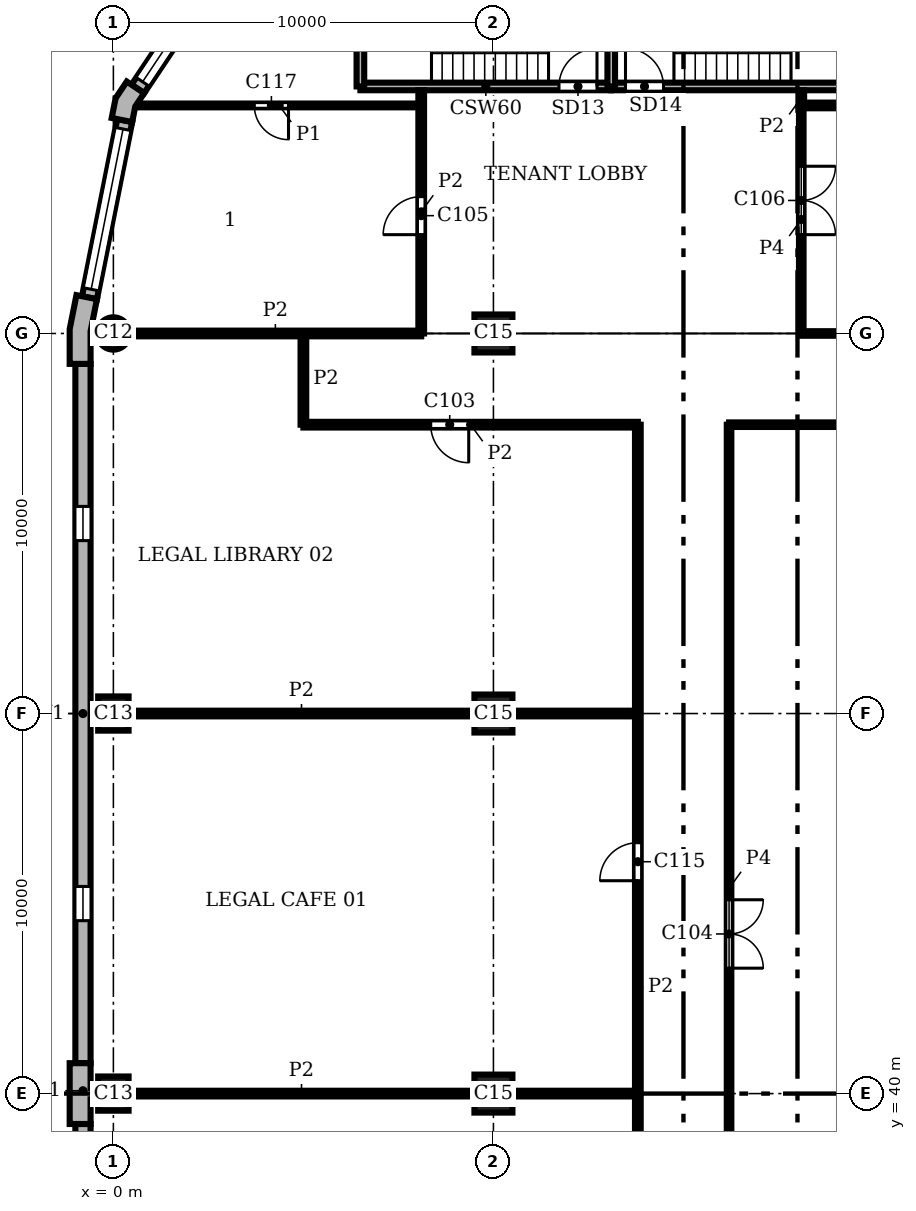
"""IFC4 building model, lengths in metres.
Left out: names, types, materials, properties, quantities, classifications, styles, units other than length and angle.
Written with IfcOpenShell. Run it as: python <this file> out.ifc"""

import sys

from ifc_helpers import new_model, si_unit, direction, frame, frame_2d, origin, origin_2d, place, context, subcontext, project, spatial, polyline, rectangle, circle, outline, extrude, element, fill, save


model = new_model("IFC4")
c1 = context("Model", 3, precision=1e-05, world=origin(), true_north=direction((0.0, 1.0)))
c2 = subcontext(c1, "Body", "Model", "MODEL_VIEW")
j1 = project(units=[si_unit("LENGTHUNIT", "METRE"), si_unit("PLANEANGLEUNIT", "RADIAN")], contexts=[c1])
p1 = place(None, origin())
s1 = spatial("IfcSite", under=j1, at=p1, CompositionType="ELEMENT")
p2 = place(p1, origin())
s2 = spatial("IfcBuilding", under=s1, at=p2, CompositionType="ELEMENT")
p3 = place(p2, frame((0.0, 0.0, 251.4)))
s3 = spatial("IfcBuildingStorey", under=s2, at=p3, CompositionType="ELEMENT", Elevation=251.4)
p4 = place(p3, frame((0.0, 60.0, 0.0), z_axis=(0.0, 0.0, 1.0), x_axis=(1.0, 0.0, 0.0)))
e1 = element("IfcColumn", 1, at=p4, inside=s3, PredefinedType="COLUMN", context=c2, shape_type="SweptSolid", body=[
    extrude(circle(Radius=0.425, at=origin_2d()), origin(), (0.0, 0.0, 1.0), 3.9),
])
for number, where, z_axis, x_axis in (
    (2, (0.0, 50.0, 0.0), (0.0, 0.0, 1.0), (0.0, 1.0, 0.0)),
    (3, (0.0, 40.0, 0.0), (0.0, 0.0, 1.0), (0.0, 1.0, 0.0)),
):
    element("IfcColumn", number, at=place(p3, frame(where, z_axis=z_axis, x_axis=x_axis)), inside=s3, PredefinedType="COLUMN", context=c2, shape_type="SweptSolid", body=[
        extrude(rectangle(XDim=0.9, YDim=0.8, at=origin_2d()), origin(), (0.0, 0.0, 1.0), 3.9),
    ])
for number, where, z_axis, x_axis in (
    (4, (10.0, 40.0, 0.0), (0.0, 0.0, 1.0), (1.0, 0.0, 0.0)),
    (5, (10.0, 50.0, 0.0), (0.0, 0.0, 1.0), (1.0, 0.0, 0.0)),
    (6, (10.0, 60.0, 0.0), (0.0, 0.0, 1.0), (1.0, 0.0, 0.0)),
):
    element("IfcColumn", number, at=place(p3, frame(where, z_axis=z_axis, x_axis=x_axis)), inside=s3, PredefinedType="COLUMN", context=c2, shape_type="SweptSolid", body=[
        extrude(rectangle(XDim=1.0, YDim=1.0, at=origin_2d()), origin(), (0.0, 0.0, 1.0), 3.9),
    ])
p5 = place(p3, origin())
e7 = element("IfcWall", 7, at=p5, inside=s3, PredefinedType="SOLIDWALL", context=c2, shape_type="SweptSolid", body=[
    extrude(outline(polyline([(0.477, 66.545), (0.352, 66.629), (0.059, 66.189), (-0.045, 65.67), (0.103, 65.641), (0.495, 65.563), (0.577, 65.974), (0.81, 66.323), (0.477, 66.545)])), origin(), (0.0, 0.0, 1.0), 3.9),
])
e8 = element("IfcWall", 8, at=p5, inside=s3, PredefinedType="SOLIDWALL", context=c2, shape_type="SweptSolid", body=[
    extrude(outline(polyline([(-0.825, 60.98), (-0.972, 61.009), (-1.15, 60.113), (-1.15, 59.2), (-1.0, 59.2), (-0.6, 59.2), (-0.6, 60.059), (-0.432, 60.902), (-0.825, 60.98)])), origin(), (0.0, 0.0, 1.0), 3.9),
])
e9 = element("IfcWall", 9, at=p5, inside=s3, PredefinedType="SOLIDWALL", context=c2, shape_type="SweptSolid", body=[
    extrude(outline(polyline([(-0.6, 39.2), (-0.6, 39.85), (-0.45, 39.85), (-0.45, 40.15), (-0.6, 40.15), (-0.6, 40.8), (-1.0, 40.8), (-1.15, 40.8), (-1.15, 40.0), (-1.15, 39.2), (-1.0, 39.2), (-0.6, 39.2)])), origin(), (0.0, 0.0, 1.0), 3.9),
])
p6 = place(p3, frame((3.284, 70.386, 0.0), z_axis=(0.0, 0.0, 1.0), x_axis=(-0.555541552266, -0.831488775454, 0.0)))
e10 = element("IfcWall", 10, at=p6, inside=s3, PredefinedType="SOLIDWALL", context=c2, shape_type="SweptSolid", body=[
    extrude(rectangle(XDim=4.753, YDim=0.4, at=frame_2d((2.376, 0.0))), origin(), (0.0, 0.0, 1.0), 3.9),
])
p7 = place(p6, frame((0.226, 0.0, 0.9)))
e11 = element("IfcOpeningElement", 11, at=p7, cuts=e10, PredefinedType="OPENING", context=c2, shape_type="SweptSolid", body=[
    extrude(rectangle(XDim=4.3, YDim=2.35, at=frame_2d((2.15, 1.175))), frame((0.0, 0.21, 0.0), z_axis=(0.0, -1.0, 0.0), x_axis=(1.0, 0.0, 0.0)), (0.0, 0.0, 1.0), 0.42),
])
p8 = place(p3, frame((0.299, 65.602, 0.0), z_axis=(0.0, 0.0, 1.0), x_axis=(-0.195098533057, -0.98078364709, 0.0)))
e12 = element("IfcWall", 12, at=p8, inside=s3, PredefinedType="SOLIDWALL", context=c2, shape_type="SweptSolid", body=[
    extrude(rectangle(XDim=4.753, YDim=0.4, at=frame_2d((2.376, 0.0))), origin(), (0.0, 0.0, 1.0), 3.9),
])
p9 = place(p8, frame((0.226, 0.0, 0.9)))
e13 = element("IfcOpeningElement", 13, at=p9, cuts=e12, PredefinedType="OPENING", context=c2, shape_type="SweptSolid", body=[
    extrude(rectangle(XDim=4.3, YDim=2.35, at=frame_2d((2.15, 1.175))), frame((0.0, 0.21, 0.0), z_axis=(0.0, -1.0, 0.0), x_axis=(1.0, 0.0, 0.0)), (0.0, 0.0, 1.0), 0.42),
])
p10 = place(p3, frame((-0.8, 59.2, 0.0), z_axis=(0.0, 0.0, 1.0), x_axis=(0.0, -1.0, 0.0)))
e14 = element("IfcWall", 14, at=p10, inside=s3, PredefinedType="SOLIDWALL", context=c2, shape_type="SweptSolid", body=[
    extrude(rectangle(XDim=18.4, YDim=0.4, at=frame_2d((9.2, 0.0))), origin(), (0.0, 0.0, 1.0), 3.9),
])
p11 = place(p10, frame((3.75, 0.0, 0.9)))
e15 = element("IfcOpeningElement", 15, at=p11, cuts=e14, PredefinedType="OPENING", context=c2, shape_type="SweptSolid", body=[
    extrude(rectangle(XDim=0.9, YDim=2.35, at=frame_2d((0.45, 1.175))), frame((0.0, 0.21, 0.0), z_axis=(0.0, -1.0, 0.0), x_axis=(1.0, 0.0, 0.0)), (0.0, 0.0, 1.0), 0.42),
])
p12 = place(p10, frame((13.75, 0.0, 0.9)))
e16 = element("IfcOpeningElement", 16, at=p12, cuts=e14, PredefinedType="OPENING", context=c2, shape_type="SweptSolid", body=[
    extrude(rectangle(XDim=0.9, YDim=2.35, at=frame_2d((0.45, 1.175))), frame((0.0, 0.21, 0.0), z_axis=(0.0, -1.0, 0.0), x_axis=(1.0, 0.0, 0.0)), (0.0, 0.0, 1.0), 0.42),
])
p13 = place(p3, frame((-0.8, 39.2, 0.0), z_axis=(0.0, 0.0, 1.0), x_axis=(0.0, -1.0, 0.0)))
e17 = element("IfcWall", 17, at=p13, inside=s3, PredefinedType="SOLIDWALL", context=c2, shape_type="SweptSolid", body=[
    extrude(rectangle(XDim=18.4, YDim=0.4, at=frame_2d((9.2, 0.0))), origin(), (0.0, 0.0, 1.0), 3.9),
])
p14 = place(p13, frame((3.75, 0.0, 0.9)))
e18 = element("IfcOpeningElement", 18, at=p14, cuts=e17, PredefinedType="OPENING", context=c2, shape_type="SweptSolid", body=[
    extrude(rectangle(XDim=0.9, YDim=2.35, at=frame_2d((0.45, 1.175))), frame((0.0, 0.21, 0.0), z_axis=(0.0, -1.0, 0.0), x_axis=(1.0, 0.0, 0.0)), (0.0, 0.0, 1.0), 0.42),
])
p15 = place(p13, frame((13.75, 0.0, 0.9)))
e19 = element("IfcOpeningElement", 19, at=p15, cuts=e17, PredefinedType="OPENING", context=c2, shape_type="SweptSolid", body=[
    extrude(rectangle(XDim=0.9, YDim=2.35, at=frame_2d((0.45, 1.175))), frame((0.0, 0.21, 0.0), z_axis=(0.0, -1.0, 0.0), x_axis=(1.0, 0.0, 0.0)), (0.0, 0.0, 1.0), 0.42),
])
p16 = place(p3, frame((6.5, 66.5, 0.0), z_axis=(0.0, 0.0, 1.0), x_axis=(1.0, 0.0, 0.0)))
e20 = element("IfcWall", 20, at=p16, inside=s3, PredefinedType="SHEAR", context=c2, shape_type="SweptSolid", body=[
    extrude(rectangle(XDim=6.6, YDim=0.2, at=frame_2d((3.3, 0.0))), origin(), (0.0, 0.0, 1.0), 3.58),
])
p17 = place(p16, frame((5.225, 0.0, 0.0)))
e21 = element("IfcOpeningElement", 21, at=p17, cuts=e20, PredefinedType="OPENING", context=c2, shape_type="SweptSolid", body=[
    extrude(rectangle(XDim=1.0, YDim=2.1, at=frame_2d((0.5, 1.05))), frame((0.0, 0.11, 0.0), z_axis=(0.0, -1.0, 0.0), x_axis=(1.0, 0.0, 0.0)), (0.0, 0.0, 1.0), 0.22),
])
p18 = place(p3, frame((13.1, 66.5, 0.0), z_axis=(0.0, 0.0, 1.0), x_axis=(1.0, 0.0, 0.0)))
e22 = element("IfcWall", 22, at=p18, inside=s3, PredefinedType="SHEAR", context=c2, shape_type="SweptSolid", body=[
    extrude(rectangle(XDim=6.6, YDim=0.2, at=frame_2d((3.3, 0.0))), origin(), (0.0, 0.0, 1.0), 3.58),
])
p19 = place(p18, frame((0.375, 0.0, 0.0)))
e23 = element("IfcOpeningElement", 23, at=p19, cuts=e22, PredefinedType="OPENING", context=c2, shape_type="SweptSolid", body=[
    extrude(rectangle(XDim=1.0, YDim=2.1, at=frame_2d((0.5, 1.05))), frame((0.0, 0.11, 0.0), z_axis=(0.0, -1.0, 0.0), x_axis=(1.0, 0.0, 0.0)), (0.0, 0.0, 1.0), 0.22),
])
for number, where, z_axis, x_axis in (
    (24, (6.5, 66.5, 0.0), (0.0, 0.0, 1.0), (0.0, 1.0, 0.0)),
    (25, (13.1, 66.5, 0.0), (0.0, 0.0, 1.0), (0.0, 1.0, 0.0)),
):
    element("IfcWall", number, at=place(p3, frame(where, z_axis=z_axis, x_axis=x_axis)), inside=s3, PredefinedType="SHEAR", context=c2, shape_type="SweptSolid", body=[
        extrude(rectangle(XDim=3.3, YDim=0.2, at=frame_2d((1.65, 0.0))), origin(), (0.0, 0.0, 1.0), 3.58),
    ])
p20 = place(p3, frame((0.627, 66.0, 0.0), z_axis=(0.0, 0.0, 1.0), x_axis=(1.0, 0.0, 0.0)))
e26 = element("IfcWall", 26, at=p20, inside=s3, PredefinedType="PARTITIONING", context=c2, shape_type="SweptSolid", body=[
    extrude(rectangle(XDim=7.473, YDim=0.1, at=frame_2d((3.736, 0.0))), origin(), (0.0, 0.0, 1.0), 3.58),
])
p21 = place(p20, frame((3.081, 0.0, 0.0)))
e27 = element("IfcOpeningElement", 27, at=p21, cuts=e26, PredefinedType="OPENING", context=c2, shape_type="SweptSolid", body=[
    extrude(rectangle(XDim=0.9, YDim=2.1, at=frame_2d((0.45, 1.05))), frame((0.0, 0.06, 0.0), z_axis=(0.0, -1.0, 0.0), x_axis=(1.0, 0.0, 0.0)), (0.0, 0.0, 1.0), 0.12),
])
p22 = place(p3, frame((5.0, 57.6, 0.0), z_axis=(0.0, 0.0, 1.0), x_axis=(0.0, 1.0, 0.0)))
e28 = element("IfcWall", 28, at=p22, inside=s3, PredefinedType="PARTITIONING", context=c2, shape_type="SweptSolid", body=[
    extrude(rectangle(XDim=2.4, YDim=0.15, at=frame_2d((1.2, 0.0))), origin(), (0.0, 0.0, 1.0), 3.58),
])
p23 = place(p3, frame((8.1, 60.0, 0.0), z_axis=(0.0, 0.0, 1.0), x_axis=(0.0, 1.0, 0.0)))
e29 = element("IfcWall", 29, at=p23, inside=s3, PredefinedType="PARTITIONING", context=c2, shape_type="SweptSolid", body=[
    extrude(rectangle(XDim=6.4, YDim=0.15, at=frame_2d((3.2, 0.0))), origin(), (0.0, 0.0, 1.0), 3.58),
])
p24 = place(p23, frame((2.6, 0.0, 0.0)))
e30 = element("IfcOpeningElement", 30, at=p24, cuts=e29, PredefinedType="OPENING", context=c2, shape_type="SweptSolid", body=[
    extrude(rectangle(XDim=1.0, YDim=2.1, at=frame_2d((0.5, 1.05))), frame((0.0, 0.085, 0.0), z_axis=(0.0, -1.0, 0.0), x_axis=(1.0, 0.0, 0.0)), (0.0, 0.0, 1.0), 0.17),
])
p25 = place(p3, frame((13.8, 28.0, 0.0), z_axis=(0.0, 0.0, 1.0), x_axis=(0.0, 1.0, 0.0)))
e31 = element("IfcWall", 31, at=p25, inside=s3, PredefinedType="PARTITIONING", context=c2, shape_type="SweptSolid", body=[
    extrude(rectangle(XDim=29.6, YDim=0.15, at=frame_2d((14.8, 0.0))), origin(), (0.0, 0.0, 1.0), 3.58),
])
p26 = place(p25, frame((17.601, 0.0, 0.0)))
e32 = element("IfcOpeningElement", 32, at=p26, cuts=e31, PredefinedType="OPENING", context=c2, shape_type="SweptSolid", body=[
    extrude(rectangle(XDim=1.0, YDim=2.1, at=frame_2d((0.5, 1.05))), frame((0.0, 0.085, 0.0), z_axis=(0.0, -1.0, 0.0), x_axis=(1.0, 0.0, 0.0)), (0.0, 0.0, 1.0), 0.17),
])
p27 = place(p3, frame((18.1, 66.0, 0.0), z_axis=(0.0, 0.0, 1.0), x_axis=(0.0, 1.0, 0.0)))
e33 = element("IfcWall", 33, at=p27, inside=s3, PredefinedType="PARTITIONING", context=c2, shape_type="SweptSolid", body=[
    extrude(rectangle(XDim=0.4, YDim=0.15, at=frame_2d((0.2, 0.0))), origin(), (0.0, 0.0, 1.0), 3.58),
])
p28 = place(p3, frame((0.4, 40.0, 0.0), z_axis=(0.0, 0.0, 1.0), x_axis=(1.0, 0.0, 0.0)))
e34 = element("IfcWall", 34, at=p28, inside=s3, PredefinedType="PARTITIONING", context=c2, shape_type="SweptSolid", body=[
    extrude(rectangle(XDim=9.1, YDim=0.15, at=frame_2d((4.55, 0.0))), origin(), (0.0, 0.0, 1.0), 3.58),
])
p29 = place(p3, frame((10.5, 40.0, 0.0), z_axis=(0.0, 0.0, 1.0), x_axis=(1.0, 0.0, 0.0)))
e35 = element("IfcWall", 35, at=p29, inside=s3, PredefinedType="PARTITIONING", context=c2, shape_type="SweptSolid", body=[
    extrude(rectangle(XDim=3.3, YDim=0.15, at=frame_2d((1.65, 0.0))), origin(), (0.0, 0.0, 1.0), 3.58),
])
p30 = place(p3, frame((0.4, 50.0, 0.0), z_axis=(0.0, 0.0, 1.0), x_axis=(1.0, 0.0, 0.0)))
e36 = element("IfcWall", 36, at=p30, inside=s3, PredefinedType="PARTITIONING", context=c2, shape_type="SweptSolid", body=[
    extrude(rectangle(XDim=9.1, YDim=0.15, at=frame_2d((4.55, 0.0))), origin(), (0.0, 0.0, 1.0), 3.58),
])
p31 = place(p3, frame((10.5, 50.0, 0.0), z_axis=(0.0, 0.0, 1.0), x_axis=(1.0, 0.0, 0.0)))
e37 = element("IfcWall", 37, at=p31, inside=s3, PredefinedType="PARTITIONING", context=c2, shape_type="SweptSolid", body=[
    extrude(rectangle(XDim=3.3, YDim=0.15, at=frame_2d((1.65, 0.0))), origin(), (0.0, 0.0, 1.0), 3.58),
])
p32 = place(p3, frame((5.0, 57.6, 0.0), z_axis=(0.0, 0.0, 1.0), x_axis=(1.0, 0.0, 0.0)))
e38 = element("IfcWall", 38, at=p32, inside=s3, PredefinedType="PARTITIONING", context=c2, shape_type="SweptSolid", body=[
    extrude(rectangle(XDim=8.8, YDim=0.15, at=frame_2d((4.4, 0.0))), origin(), (0.0, 0.0, 1.0), 3.58),
])
p33 = place(p32, frame((3.35, 0.0, 0.0)))
e39 = element("IfcOpeningElement", 39, at=p33, cuts=e38, PredefinedType="OPENING", context=c2, shape_type="SweptSolid", body=[
    extrude(rectangle(XDim=1.0, YDim=2.1, at=frame_2d((0.5, 1.05))), frame((0.0, 0.085, 0.0), z_axis=(0.0, -1.0, 0.0), x_axis=(1.0, 0.0, 0.0)), (0.0, 0.0, 1.0), 0.17),
])
p34 = place(p3, frame((0.425, 60.0, 0.0), z_axis=(0.0, 0.0, 1.0), x_axis=(1.0, 0.0, 0.0)))
e40 = element("IfcWall", 40, at=p34, inside=s3, PredefinedType="PARTITIONING", context=c2, shape_type="SweptSolid", body=[
    extrude(rectangle(XDim=7.675, YDim=0.15, at=frame_2d((3.837, 0.0))), origin(), (0.0, 0.0, 1.0), 3.58),
])
p35 = place(p3, frame((18.1, 66.0, 0.0), z_axis=(0.0, 0.0, 1.0), x_axis=(1.0, 0.0, 0.0)))
e41 = element("IfcWall", 41, at=p35, inside=s3, PredefinedType="PARTITIONING", context=c2, shape_type="SweptSolid", body=[
    extrude(rectangle(XDim=11.256, YDim=0.15, at=frame_2d((5.628, 0.0))), origin(), (0.0, 0.0, 1.0), 3.58),
])
p36 = place(p3, frame((16.2, 33.2, 0.0), z_axis=(0.0, 0.0, 1.0), x_axis=(0.0, 1.0, 0.0)))
e42 = element("IfcWall", 42, at=p36, inside=s3, PredefinedType="PARTITIONING", context=c2, shape_type="SweptSolid", body=[
    extrude(rectangle(XDim=24.4, YDim=0.12, at=frame_2d((12.2, 0.0))), origin(), (0.0, 0.0, 1.0), 3.58),
])
p37 = place(p36, frame((10.1, 0.0, 0.0)))
e43 = element("IfcOpeningElement", 43, at=p37, cuts=e42, PredefinedType="OPENING", context=c2, shape_type="SweptSolid", body=[
    extrude(rectangle(XDim=1.8, YDim=2.1, at=frame_2d((0.9, 1.05))), frame((0.0, 0.07, 0.0), z_axis=(0.0, -1.0, 0.0), x_axis=(1.0, 0.0, 0.0)), (0.0, 0.0, 1.0), 0.14),
])
p38 = place(p3, frame((18.1, 60.0, 0.0), z_axis=(0.0, 0.0, 1.0), x_axis=(0.0, 1.0, 0.0)))
e44 = element("IfcWall", 44, at=p38, inside=s3, PredefinedType="PARTITIONING", context=c2, shape_type="SweptSolid", body=[
    extrude(rectangle(XDim=6.0, YDim=0.12, at=frame_2d((3.0, 0.0))), origin(), (0.0, 0.0, 1.0), 3.58),
])
p39 = place(p38, frame((2.6, 0.0, 0.0)))
e45 = element("IfcOpeningElement", 45, at=p39, cuts=e44, PredefinedType="OPENING", context=c2, shape_type="SweptSolid", body=[
    extrude(rectangle(XDim=1.8, YDim=2.1, at=frame_2d((0.9, 1.05))), frame((0.0, 0.07, 0.0), z_axis=(0.0, -1.0, 0.0), x_axis=(1.0, 0.0, 0.0)), (0.0, 0.0, 1.0), 0.14),
])
p40 = place(p3, frame((16.2, 57.6, 0.0), z_axis=(0.0, 0.0, 1.0), x_axis=(1.0, 0.0, 0.0)))
e46 = element("IfcWall", 46, at=p40, inside=s3, PredefinedType="PARTITIONING", context=c2, shape_type="SweptSolid", body=[
    extrude(rectangle(XDim=8.8, YDim=0.12, at=frame_2d((4.4, 0.0))), origin(), (0.0, 0.0, 1.0), 3.58),
])
p41 = place(p3, frame((18.1, 60.0, 0.0), z_axis=(0.0, 0.0, 1.0), x_axis=(1.0, 0.0, 0.0)))
e47 = element("IfcWall", 47, at=p41, inside=s3, PredefinedType="PARTITIONING", context=c2, shape_type="SweptSolid", body=[
    extrude(rectangle(XDim=1.4, YDim=0.12, at=frame_2d((0.7, 0.0))), origin(), (0.0, 0.0, 1.0), 3.58),
])
p42 = place(p7, origin())
e48 = element("IfcWindow", 48, at=p42, inside=s3, PartitioningType="SINGLE_PANEL", PredefinedType="WINDOW", context=c2, shape_type="SweptSolid", body=[
    extrude(rectangle(XDim=4.3, YDim=2.35, at=frame_2d((2.15, 1.175))), frame((0.0, 0.16, 0.0), z_axis=(0.0, -1.0, 0.0), x_axis=(1.0, 0.0, 0.0)), (0.0, 0.0, 1.0), 0.06),
])
fill(e11, e48)
p43 = place(p9, origin())
e49 = element("IfcWindow", 49, at=p43, inside=s3, PartitioningType="SINGLE_PANEL", PredefinedType="WINDOW", context=c2, shape_type="SweptSolid", body=[
    extrude(rectangle(XDim=4.3, YDim=2.35, at=frame_2d((2.15, 1.175))), frame((0.0, 0.16, 0.0), z_axis=(0.0, -1.0, 0.0), x_axis=(1.0, 0.0, 0.0)), (0.0, 0.0, 1.0), 0.06),
])
fill(e13, e49)
p44 = place(p11, origin())
e50 = element("IfcWindow", 50, at=p44, inside=s3, PartitioningType="SINGLE_PANEL", PredefinedType="WINDOW", context=c2, shape_type="SweptSolid", body=[
    extrude(rectangle(XDim=0.9, YDim=2.35, at=frame_2d((0.45, 1.175))), frame((0.0, 0.16, 0.0), z_axis=(0.0, -1.0, 0.0), x_axis=(1.0, 0.0, 0.0)), (0.0, 0.0, 1.0), 0.06),
])
fill(e15, e50)
p45 = place(p12, origin())
e51 = element("IfcWindow", 51, at=p45, inside=s3, PartitioningType="SINGLE_PANEL", PredefinedType="WINDOW", context=c2, shape_type="SweptSolid", body=[
    extrude(rectangle(XDim=0.9, YDim=2.35, at=frame_2d((0.45, 1.175))), frame((0.0, 0.16, 0.0), z_axis=(0.0, -1.0, 0.0), x_axis=(1.0, 0.0, 0.0)), (0.0, 0.0, 1.0), 0.06),
])
fill(e16, e51)
p46 = place(p17, origin())
e52 = element("IfcDoor", 52, at=p46, inside=s3, OperationType="SINGLE_SWING_RIGHT", PredefinedType="DOOR", context=c2, shape_type="SweptSolid", body=[
    extrude(rectangle(XDim=1.0, YDim=2.1, at=frame_2d((0.5, 1.05))), frame((0.0, 0.025, 0.0), z_axis=(0.0, -1.0, 0.0), x_axis=(1.0, 0.0, 0.0)), (0.0, 0.0, 1.0), 0.05),
])
fill(e21, e52)
p47 = place(p19, origin())
e53 = element("IfcDoor", 53, at=p47, inside=s3, OperationType="SINGLE_SWING_LEFT", PredefinedType="DOOR", context=c2, shape_type="SweptSolid", body=[
    extrude(rectangle(XDim=1.0, YDim=2.1, at=frame_2d((0.5, 1.05))), frame((0.0, 0.025, 0.0), z_axis=(0.0, -1.0, 0.0), x_axis=(1.0, 0.0, 0.0)), (0.0, 0.0, 1.0), 0.05),
])
fill(e23, e53)
p48 = place(p33, frame((1.0, 0.0, 0.0), z_axis=(0.0, 0.0, 1.0), x_axis=(-1.0, 0.0, 0.0)))
e54 = element("IfcDoor", 54, at=p48, inside=s3, OperationType="SINGLE_SWING_LEFT", PredefinedType="DOOR", context=c2, shape_type="SweptSolid", body=[
    extrude(rectangle(XDim=1.0, YDim=2.1, at=frame_2d((0.5, 1.05))), frame((0.0, 0.025, 0.0), z_axis=(0.0, -1.0, 0.0), x_axis=(1.0, 0.0, 0.0)), (0.0, 0.0, 1.0), 0.05),
])
fill(e39, e54)
p49 = place(p37, frame((1.8, 0.0, 0.0), z_axis=(0.0, 0.0, 1.0), x_axis=(-1.0, 0.0, 0.0)))
e55 = element("IfcDoor", 55, at=p49, inside=s3, OperationType="DOUBLE_DOOR_SINGLE_SWING", PredefinedType="DOOR", context=c2, shape_type="SweptSolid", body=[
    extrude(rectangle(XDim=1.8, YDim=2.1, at=frame_2d((0.9, 1.05))), frame((0.0, 0.025, 0.0), z_axis=(0.0, -1.0, 0.0), x_axis=(1.0, 0.0, 0.0)), (0.0, 0.0, 1.0), 0.05),
])
fill(e43, e55)
p50 = place(p24, origin())
e56 = element("IfcDoor", 56, at=p50, inside=s3, OperationType="SINGLE_SWING_LEFT", PredefinedType="DOOR", context=c2, shape_type="SweptSolid", body=[
    extrude(rectangle(XDim=1.0, YDim=2.1, at=frame_2d((0.5, 1.05))), frame((0.0, 0.025, 0.0), z_axis=(0.0, -1.0, 0.0), x_axis=(1.0, 0.0, 0.0)), (0.0, 0.0, 1.0), 0.05),
])
fill(e30, e56)
p51 = place(p39, frame((1.8, 0.0, 0.0), z_axis=(0.0, 0.0, 1.0), x_axis=(-1.0, 0.0, 0.0)))
e57 = element("IfcDoor", 57, at=p51, inside=s3, OperationType="DOUBLE_DOOR_SINGLE_SWING", PredefinedType="DOOR", context=c2, shape_type="SweptSolid", body=[
    extrude(rectangle(XDim=1.8, YDim=2.1, at=frame_2d((0.9, 1.05))), frame((0.0, 0.025, 0.0), z_axis=(0.0, -1.0, 0.0), x_axis=(1.0, 0.0, 0.0)), (0.0, 0.0, 1.0), 0.05),
])
fill(e45, e57)
p52 = place(p26, origin())
e58 = element("IfcDoor", 58, at=p52, inside=s3, OperationType="SINGLE_SWING_LEFT", PredefinedType="DOOR", context=c2, shape_type="SweptSolid", body=[
    extrude(rectangle(XDim=1.0, YDim=2.1, at=frame_2d((0.5, 1.05))), frame((0.0, 0.025, 0.0), z_axis=(0.0, -1.0, 0.0), x_axis=(1.0, 0.0, 0.0)), (0.0, 0.0, 1.0), 0.05),
])
fill(e32, e58)
p53 = place(p21, frame((0.9, 0.0, 0.0), z_axis=(0.0, 0.0, 1.0), x_axis=(-1.0, 0.0, 0.0)))
e59 = element("IfcDoor", 59, at=p53, inside=s3, OperationType="SINGLE_SWING_LEFT", PredefinedType="DOOR", context=c2, shape_type="SweptSolid", body=[
    extrude(rectangle(XDim=0.9, YDim=2.1, at=frame_2d((0.45, 1.05))), frame((0.0, 0.025, 0.0), z_axis=(0.0, -1.0, 0.0), x_axis=(1.0, 0.0, 0.0)), (0.0, 0.0, 1.0), 0.05),
])
fill(e27, e59)
save(model, sys.argv[1])
